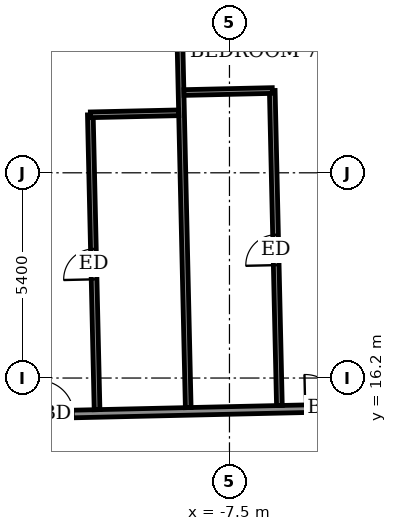
"""IFC4 building model, lengths in metres.
Left out: names, types, materials, properties, quantities, classifications, styles, units other than length and angle.
Written with IfcOpenShell. Run it as: python <this file> out.ifc"""

import sys

from ifc_helpers import new_model, si_unit, direction, frame, frame_2d, origin, place, context, subcontext, project, spatial, rectangle, extrude, element, fill, save


model = new_model("IFC4")
c1 = context("Model", 3, precision=1e-05, world=origin(), true_north=direction((0.0, 1.0)))
c2 = subcontext(c1, "Body", "Model", "MODEL_VIEW")
j1 = project(units=[si_unit("LENGTHUNIT", "METRE"), si_unit("PLANEANGLEUNIT", "RADIAN")], contexts=[c1])
p1 = place(None, origin())
s1 = spatial("IfcSite", under=j1, at=p1, CompositionType="ELEMENT")
p2 = place(p1, origin())
s2 = spatial("IfcBuilding", under=s1, at=p2, CompositionType="ELEMENT")
p3 = place(p2, frame((0.0, 0.0, 287.1)))
s3 = spatial("IfcBuildingStorey", under=s2, at=p3, CompositionType="ELEMENT", Elevation=287.1)
p4 = place(p3, frame((-26.401, 14.918, 0.0), z_axis=(0.0, 0.0, 1.0), x_axis=(0.99974239733, 0.022696673341, 0.0)))
e1 = element("IfcWall", 1, at=p4, inside=s3, PredefinedType="PARTITIONING", context=c2, shape_type="SweptSolid", body=[
    extrude(rectangle(XDim=55.386, YDim=0.2, at=frame_2d((27.693, 0.0))), origin(), (0.0, 0.0, 1.0), 3.05),
])
p5 = place(p4, frame((52.889, 0.0, 0.0)))
e2 = element("IfcOpeningElement", 2, at=p5, cuts=e1, PredefinedType="OPENING", context=c2, shape_type="SweptSolid", body=[
    extrude(rectangle(XDim=1.0, YDim=2.1, at=frame_2d((0.5, 1.05))), frame((0.0, 0.11, 0.0), z_axis=(0.0, -1.0, 0.0), x_axis=(1.0, 0.0, 0.0)), (0.0, 0.0, 1.0), 0.22),
])
p6 = place(p4, frame((48.6, 0.0, 0.0)))
e3 = element("IfcOpeningElement", 3, at=p6, cuts=e1, PredefinedType="OPENING", context=c2, shape_type="SweptSolid", body=[
    extrude(rectangle(XDim=0.9, YDim=2.1, at=frame_2d((0.45, 1.05))), frame((0.0, 0.11, 0.0), z_axis=(0.0, -1.0, 0.0), x_axis=(1.0, 0.0, 0.0)), (0.0, 0.0, 1.0), 0.22),
])
p7 = place(p4, frame((41.8, 0.0, 0.0)))
e4 = element("IfcOpeningElement", 4, at=p7, cuts=e1, PredefinedType="OPENING", context=c2, shape_type="SweptSolid", body=[
    extrude(rectangle(XDim=0.9, YDim=2.1, at=frame_2d((0.45, 1.05))), frame((0.0, 0.11, 0.0), z_axis=(0.0, -1.0, 0.0), x_axis=(1.0, 0.0, 0.0)), (0.0, 0.0, 1.0), 0.22),
])
p8 = place(p4, frame((39.675, 0.0, 0.0)))
e5 = element("IfcOpeningElement", 5, at=p8, cuts=e1, PredefinedType="OPENING", context=c2, shape_type="SweptSolid", body=[
    extrude(rectangle(XDim=0.9, YDim=2.1, at=frame_2d((0.45, 1.05))), frame((0.0, 0.11, 0.0), z_axis=(0.0, -1.0, 0.0), x_axis=(1.0, 0.0, 0.0)), (0.0, 0.0, 1.0), 0.22),
])
p9 = place(p4, frame((32.675, 0.0, 0.0)))
e6 = element("IfcOpeningElement", 6, at=p9, cuts=e1, PredefinedType="OPENING", context=c2, shape_type="SweptSolid", body=[
    extrude(rectangle(XDim=0.9, YDim=2.1, at=frame_2d((0.45, 1.05))), frame((0.0, 0.11, 0.0), z_axis=(0.0, -1.0, 0.0), x_axis=(1.0, 0.0, 0.0)), (0.0, 0.0, 1.0), 0.22),
])
p10 = place(p4, frame((30.4, 0.0, 0.0)))
e7 = element("IfcOpeningElement", 7, at=p10, cuts=e1, PredefinedType="OPENING", context=c2, shape_type="SweptSolid", body=[
    extrude(rectangle(XDim=0.9, YDim=2.1, at=frame_2d((0.45, 1.05))), frame((0.0, 0.11, 0.0), z_axis=(0.0, -1.0, 0.0), x_axis=(1.0, 0.0, 0.0)), (0.0, 0.0, 1.0), 0.22),
])
p11 = place(p4, frame((23.225, 0.0, 0.0)))
e8 = element("IfcOpeningElement", 8, at=p11, cuts=e1, PredefinedType="OPENING", context=c2, shape_type="SweptSolid", body=[
    extrude(rectangle(XDim=0.9, YDim=2.1, at=frame_2d((0.45, 1.05))), frame((0.0, 0.11, 0.0), z_axis=(0.0, -1.0, 0.0), x_axis=(1.0, 0.0, 0.0)), (0.0, 0.0, 1.0), 0.22),
])
p12 = place(p4, frame((20.9, 0.0, 0.0)))
e9 = element("IfcOpeningElement", 9, at=p12, cuts=e1, PredefinedType="OPENING", context=c2, shape_type="SweptSolid", body=[
    extrude(rectangle(XDim=0.9, YDim=2.1, at=frame_2d((0.45, 1.05))), frame((0.0, 0.11, 0.0), z_axis=(0.0, -1.0, 0.0), x_axis=(1.0, 0.0, 0.0)), (0.0, 0.0, 1.0), 0.22),
])
p13 = place(p4, frame((13.9, 0.0, 0.0)))
e10 = element("IfcOpeningElement", 10, at=p13, cuts=e1, PredefinedType="OPENING", context=c2, shape_type="SweptSolid", body=[
    extrude(rectangle(XDim=0.9, YDim=2.1, at=frame_2d((0.45, 1.05))), frame((0.0, 0.11, 0.0), z_axis=(0.0, -1.0, 0.0), x_axis=(1.0, 0.0, 0.0)), (0.0, 0.0, 1.0), 0.22),
])
p14 = place(p4, frame((11.775, 0.0, 0.0)))
e11 = element("IfcOpeningElement", 11, at=p14, cuts=e1, PredefinedType="OPENING", context=c2, shape_type="SweptSolid", body=[
    extrude(rectangle(XDim=0.9, YDim=2.1, at=frame_2d((0.45, 1.05))), frame((0.0, 0.11, 0.0), z_axis=(0.0, -1.0, 0.0), x_axis=(1.0, 0.0, 0.0)), (0.0, 0.0, 1.0), 0.22),
])
p15 = place(p4, frame((1.65, 0.0, 0.0)))
e12 = element("IfcOpeningElement", 12, at=p15, cuts=e1, PredefinedType="OPENING", context=c2, shape_type="SweptSolid", body=[
    extrude(rectangle(XDim=1.0, YDim=2.1, at=frame_2d((0.5, 1.05))), frame((0.0, 0.11, 0.0), z_axis=(0.0, -1.0, 0.0), x_axis=(1.0, 0.0, 0.0)), (0.0, 0.0, 1.0), 0.22),
])
p16 = place(p4, frame((7.025, 0.0, 0.0)))
e13 = element("IfcOpeningElement", 13, at=p16, cuts=e1, PredefinedType="OPENING", context=c2, shape_type="SweptSolid", body=[
    extrude(rectangle(XDim=0.9, YDim=2.1, at=frame_2d((0.45, 1.05))), frame((0.0, 0.11, 0.0), z_axis=(0.0, -1.0, 0.0), x_axis=(1.0, 0.0, 0.0)), (0.0, 0.0, 1.0), 0.22),
])
p17 = place(p3, frame((-10.984, 15.368, 0.0), z_axis=(0.0, 0.0, 1.0), x_axis=(-0.022809307977, 0.999739833892, 0.0)))
e14 = element("IfcWall", 14, at=p17, inside=s3, PredefinedType="PARTITIONING", context=c2, shape_type="SweptSolid", body=[
    extrude(rectangle(XDim=7.76, YDim=0.15, at=frame_2d((3.88, 0.0))), origin(), (0.0, 0.0, 1.0), 3.05),
])
p18 = place(p17, frame((3.43, 0.0, 0.0)))
e15 = element("IfcOpeningElement", 15, at=p18, cuts=e14, PredefinedType="OPENING", context=c2, shape_type="SweptSolid", body=[
    extrude(rectangle(XDim=0.8, YDim=2.1, at=frame_2d((0.4, 1.05))), frame((0.0, 0.085, 0.0), z_axis=(0.0, -1.0, 0.0), x_axis=(1.0, 0.0, 0.0)), (0.0, 0.0, 1.0), 0.17),
])
p19 = place(p3, frame((-8.585, 15.422, 0.0), z_axis=(0.0, 0.0, 1.0), x_axis=(-0.02273928012, 0.99974142914, 0.0)))
e16 = element("IfcWall", 16, at=p19, inside=s3, PredefinedType="PARTITIONING", context=c2, shape_type="SweptSolid", body=[
    extrude(rectangle(XDim=12.1, YDim=0.15, at=frame_2d((6.05, 0.0))), origin(), (0.0, 0.0, 1.0), 2.5),
])
p20 = place(p3, frame((-6.186, 15.477, 0.0), z_axis=(0.0, 0.0, 1.0), x_axis=(-0.022676583998, 0.999742853207, 0.0)))
e17 = element("IfcWall", 17, at=p20, inside=s3, PredefinedType="PARTITIONING", context=c2, shape_type="SweptSolid", body=[
    extrude(rectangle(XDim=8.29, YDim=0.15, at=frame_2d((4.145, 0.0))), origin(), (0.0, 0.0, 1.0), 3.05),
])
p21 = place(p20, frame((3.695, 0.0, 0.0)))
e18 = element("IfcOpeningElement", 18, at=p21, cuts=e17, PredefinedType="OPENING", context=c2, shape_type="SweptSolid", body=[
    extrude(rectangle(XDim=0.8, YDim=2.1, at=frame_2d((0.4, 1.05))), frame((0.0, 0.085, 0.0), z_axis=(0.0, -1.0, 0.0), x_axis=(1.0, 0.0, 0.0)), (0.0, 0.0, 1.0), 0.17),
])
p22 = place(p3, frame((-11.159, 23.126, 0.0), z_axis=(0.0, 0.0, 1.0), x_axis=(0.999740478815, 0.022781023197, 0.0)))
e19 = element("IfcWall", 19, at=p22, inside=s3, PredefinedType="PARTITIONING", context=c2, shape_type="SweptSolid", body=[
    extrude(rectangle(XDim=2.325, YDim=0.15, at=frame_2d((1.163, 0.0))), origin(), (0.0, 0.0, 1.0), 3.05),
])
p23 = place(p3, frame((-8.696, 23.712, 0.0), z_axis=(0.0, 0.0, 1.0), x_axis=(0.999740260747, 0.02279059109, 0.0)))
e20 = element("IfcWall", 20, at=p23, inside=s3, PredefinedType="PARTITIONING", context=c2, shape_type="SweptSolid", body=[
    extrude(rectangle(XDim=2.324, YDim=0.15, at=frame_2d((1.162, 0.0))), origin(), (0.0, 0.0, 1.0), 3.05),
])
p24 = place(p12, origin())
e21 = element("IfcDoor", 21, at=p24, inside=s3, OperationType="SINGLE_SWING_RIGHT", PredefinedType="DOOR", context=c2, shape_type="SweptSolid", body=[
    extrude(rectangle(XDim=0.9, YDim=2.1, at=frame_2d((0.45, 1.05))), frame((0.0, 0.025, 0.0), z_axis=(0.0, -1.0, 0.0), x_axis=(1.0, 0.0, 0.0)), (0.0, 0.0, 1.0), 0.05),
])
fill(e9, e21)
p25 = place(p21, origin())
e22 = element("IfcDoor", 22, at=p25, inside=s3, OperationType="SINGLE_SWING_RIGHT", PredefinedType="DOOR", context=c2, shape_type="SweptSolid", body=[
    extrude(rectangle(XDim=0.8, YDim=2.1, at=frame_2d((0.4, 1.05))), frame((0.0, 0.025, 0.0), z_axis=(0.0, -1.0, 0.0), x_axis=(1.0, 0.0, 0.0)), (0.0, 0.0, 1.0), 0.05),
])
fill(e18, e22)
p26 = place(p13, origin())
e23 = element("IfcDoor", 23, at=p26, inside=s3, OperationType="SINGLE_SWING_LEFT", PredefinedType="DOOR", context=c2, shape_type="SweptSolid", body=[
    extrude(rectangle(XDim=0.9, YDim=2.1, at=frame_2d((0.45, 1.05))), frame((0.0, 0.025, 0.0), z_axis=(0.0, -1.0, 0.0), x_axis=(1.0, 0.0, 0.0)), (0.0, 0.0, 1.0), 0.05),
])
fill(e10, e23)
p27 = place(p18, origin())
e24 = element("IfcDoor", 24, at=p27, inside=s3, OperationType="SINGLE_SWING_LEFT", PredefinedType="DOOR", context=c2, shape_type="SweptSolid", body=[
    extrude(rectangle(XDim=0.8, YDim=2.1, at=frame_2d((0.4, 1.05))), frame((0.0, 0.025, 0.0), z_axis=(0.0, -1.0, 0.0), x_axis=(1.0, 0.0, 0.0)), (0.0, 0.0, 1.0), 0.05),
])
fill(e15, e24)
save(model, sys.argv[1])
